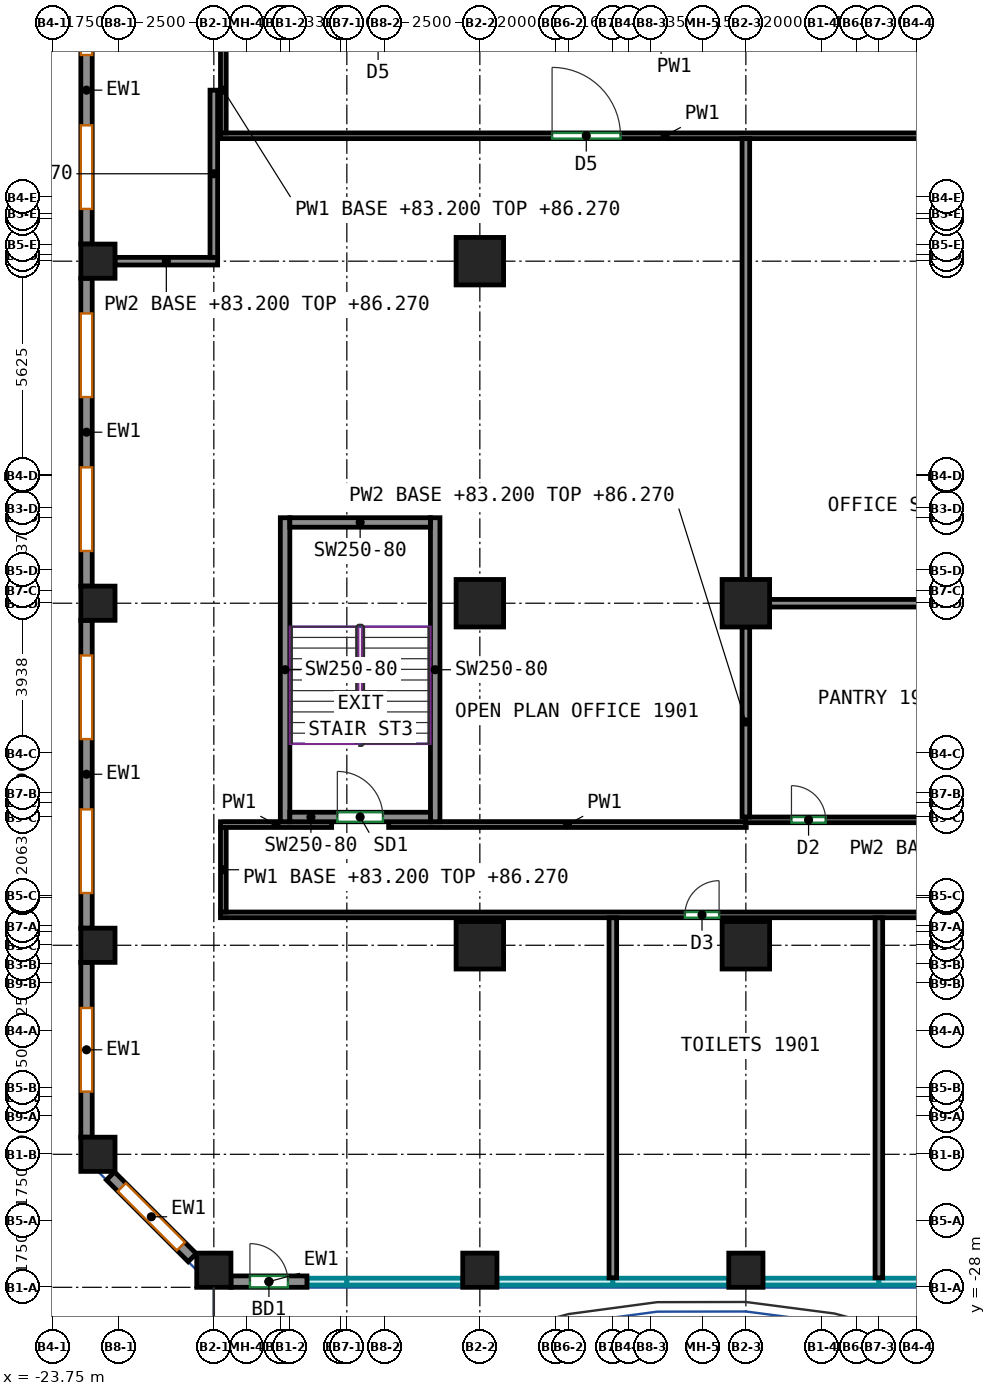
"""IFC4 building model, lengths in metres.
Left out: names, types, materials, properties, quantities, classifications, styles, units other than length and angle.
Written with IfcOpenShell. Run it as: python <this file> out.ifc"""

import sys

from ifc_helpers import new_model, si_unit, direction, frame, frame_2d, origin, origin_2d, place, context, subcontext, project, spatial, rectangle, extrude, source, transform, mapped, element, fill, save


model = new_model("IFC4")
c1 = context("Model", 3, precision=1e-05, world=origin(), true_north=direction((0.0, 1.0)))
c2 = subcontext(c1, "Body", "Model", "MODEL_VIEW")
j1 = project(units=[si_unit("LENGTHUNIT", "METRE"), si_unit("PLANEANGLEUNIT", "RADIAN")], contexts=[c1])
p1 = place(None, origin())
s1 = spatial("IfcSite", under=j1, at=p1, CompositionType="ELEMENT")
p2 = place(p1, origin())
s2 = spatial("IfcBuilding", under=s1, at=p2, CompositionType="ELEMENT")
p3 = place(p2, frame((0.0, 0.0, 83.2)))
s3 = spatial("IfcBuildingStorey", under=s2, at=p3, CompositionType="ELEMENT", Elevation=83.2)
m1 = source(origin(), c2, "Body", "SweptSolid", [
    extrude(rectangle(XDim=0.9, YDim=0.9, at=origin_2d()), origin(), (0.0, 0.0, 1.0), 3.72),
])
for number, where, z_axis, x_axis in (
    (1, (-22.55, -24.5, 0.0), (0.0, 0.0, 1.0), (1.0, 0.0, 0.0)),
    (2, (-22.55, -19.0, 0.0), (0.0, 0.0, 1.0), (1.0, 0.0, 0.0)),
    (3, (-22.55, -10.0, 0.0), (0.0, 0.0, 1.0), (1.0, 0.0, 0.0)),
    (4, (-22.55, -1.0, 0.0), (0.0, 0.0, 1.0), (1.0, 0.0, 0.0)),
    (5, (-19.5, -27.55, 0.0), (0.0, 0.0, 1.0), (1.0, 0.0, 0.0)),
    (6, (-12.5, -27.55, 0.0), (0.0, 0.0, 1.0), (1.0, 0.0, 0.0)),
):
    element("IfcColumn", number, at=place(p3, frame(where, z_axis=z_axis, x_axis=x_axis)), inside=s3, PredefinedType="COLUMN", context=c2, shape_type="MappedRepresentation", body=[
        mapped(m1, transform((0.0, 0.0, 0.0))),
    ])
m2 = source(origin(), c2, "Body", "SweptSolid", [
    extrude(rectangle(XDim=1.25, YDim=1.25, at=origin_2d()), origin(), (0.0, 0.0, 1.0), 3.72),
])
for number, where, z_axis, x_axis in (
    (7, (-12.5, -19.0, 0.0), (0.0, 0.0, 1.0), (1.0, 0.0, 0.0)),
    (8, (-12.5, -10.0, 0.0), (0.0, 0.0, 1.0), (1.0, 0.0, 0.0)),
    (9, (-12.5, -1.0, 0.0), (0.0, 0.0, 1.0), (1.0, 0.0, 0.0)),
):
    element("IfcColumn", number, at=place(p3, frame(where, z_axis=z_axis, x_axis=x_axis)), inside=s3, PredefinedType="COLUMN", context=c2, shape_type="MappedRepresentation", body=[
        mapped(m2, transform((0.0, 0.0, 0.0))),
    ])
p4 = place(p3, frame((-5.5, -27.55, 0.0), z_axis=(0.0, 0.0, 1.0), x_axis=(1.0, 0.0, 0.0)))
e10 = element("IfcColumn", 10, at=p4, inside=s3, PredefinedType="COLUMN", context=c2, shape_type="MappedRepresentation", body=[
    mapped(m1, transform((0.0, 0.0, 0.0))),
])
for number, where, z_axis, x_axis in (
    (11, (-5.5, -19.0, 0.0), (0.0, 0.0, 1.0), (1.0, 0.0, 0.0)),
    (12, (-5.5, -10.0, 0.0), (0.0, 0.0, 1.0), (1.0, 0.0, 0.0)),
):
    element("IfcColumn", number, at=place(p3, frame(where, z_axis=z_axis, x_axis=x_axis)), inside=s3, PredefinedType="COLUMN", context=c2, shape_type="MappedRepresentation", body=[
        mapped(m2, transform((0.0, 0.0, 0.0))),
    ])
m3 = source(origin(), c2, "Body", "SweptSolid", [
    extrude(rectangle(XDim=8.0, YDim=0.25, at=frame_2d((4.0, 0.0))), origin(), (0.0, 0.0, 1.0), 3.72),
])
for number, where, z_axis, x_axis in (
    (13, (-17.625, -15.75, 0.0), (0.0, 0.0, 1.0), (0.0, 1.0, 0.0)),
    (14, (-13.675, -15.75, 0.0), (0.0, 0.0, 1.0), (0.0, 1.0, 0.0)),
):
    element("IfcWall", number, at=place(p3, frame(where, z_axis=z_axis, x_axis=x_axis)), inside=s3, PredefinedType="SHEAR", context=c2, shape_type="MappedRepresentation", body=[
        mapped(m3, transform((0.0, 0.0, 0.0))),
    ])
m4 = source(origin(), c2, "Body", "SweptSolid", [
    extrude(rectangle(XDim=3.7, YDim=0.25, at=frame_2d((1.85, 0.0))), origin(), (0.0, 0.0, 1.0), 3.72),
])
p5 = place(p3, frame((-17.5, -15.625, 0.0), z_axis=(0.0, 0.0, 1.0), x_axis=(1.0, 0.0, 0.0)))
e15 = element("IfcWall", 15, at=p5, inside=s3, PredefinedType="SHEAR", context=c2, shape_type="MappedRepresentation", body=[
    mapped(m4, transform((0.0, 0.0, 0.0))),
])
p6 = place(p5, frame((1.25, 0.0, 0.0)))
e16 = element("IfcOpeningElement", 16, at=p6, cuts=e15, PredefinedType="OPENING", context=c2, shape_type="SweptSolid", body=[
    extrude(rectangle(XDim=1.2, YDim=2.1, at=frame_2d((0.6, 1.05))), frame((0.0, 0.135, 0.0), z_axis=(0.0, -1.0, 0.0), x_axis=(1.0, 0.0, 0.0)), (0.0, 0.0, 1.0), 0.27),
])
p7 = place(p3, frame((-17.5, -7.875, 0.0), z_axis=(0.0, 0.0, 1.0), x_axis=(1.0, 0.0, 0.0)))
e17 = element("IfcWall", 17, at=p7, inside=s3, PredefinedType="SHEAR", context=c2, shape_type="MappedRepresentation", body=[
    mapped(m4, transform((0.0, 0.0, 0.0))),
])
m5 = source(origin(), c2, "Body", "SweptSolid", [
    extrude(rectangle(XDim=2.0, YDim=0.3, at=frame_2d((1.0, 0.0))), origin(), (0.0, 0.0, 1.0), 3.72),
])
p8 = place(p3, frame((-19.05, -27.85, 0.0), z_axis=(0.0, 0.0, 1.0), x_axis=(1.0, 0.0, 0.0)))
e18 = element("IfcWall", 18, at=p8, inside=s3, PredefinedType="SOLIDWALL", context=c2, shape_type="MappedRepresentation", body=[
    mapped(m5, transform((0.0, 0.0, 0.0))),
])
p9 = place(p8, frame((0.5, 0.0, 0.0)))
e19 = element("IfcOpeningElement", 19, at=p9, cuts=e18, PredefinedType="OPENING", context=c2, shape_type="SweptSolid", body=[
    extrude(rectangle(XDim=1.0, YDim=2.1, at=frame_2d((0.5, 1.05))), frame((0.0, 0.16, 0.0), z_axis=(0.0, -1.0, 0.0), x_axis=(1.0, 0.0, 0.0)), (0.0, 0.0, 1.0), 0.32),
])
m6 = source(origin(), c2, "Body", "SweptSolid", [
    extrude(rectangle(XDim=8.1, YDim=0.3, at=frame_2d((4.05, 0.0))), origin(), (0.0, 0.0, 1.0), 3.72),
])
p10 = place(p3, frame((-22.85, 7.55, 0.0), z_axis=(0.0, 0.0, 1.0), x_axis=(0.0, -1.0, 0.0)))
e20 = element("IfcWall", 20, at=p10, inside=s3, PredefinedType="SOLIDWALL", context=c2, shape_type="MappedRepresentation", body=[
    mapped(m6, transform((0.0, 0.0, 0.0))),
])
p11 = place(p10, frame((0.925, 0.0, 0.7)))
e21 = element("IfcOpeningElement", 21, at=p11, cuts=e20, PredefinedType="OPENING", context=c2, shape_type="SweptSolid", body=[
    extrude(rectangle(XDim=2.2, YDim=2.25, at=frame_2d((1.1, 1.125))), frame((0.0, 0.16, 0.0), z_axis=(0.0, -1.0, 0.0), x_axis=(1.0, 0.0, 0.0)), (0.0, 0.0, 1.0), 0.32),
])
p12 = place(p10, frame((4.975, 0.0, 0.7)))
e22 = element("IfcOpeningElement", 22, at=p12, cuts=e20, PredefinedType="OPENING", context=c2, shape_type="SweptSolid", body=[
    extrude(rectangle(XDim=2.2, YDim=2.25, at=frame_2d((1.1, 1.125))), frame((0.0, 0.16, 0.0), z_axis=(0.0, -1.0, 0.0), x_axis=(1.0, 0.0, 0.0)), (0.0, 0.0, 1.0), 0.32),
])
p13 = place(p3, frame((-22.85, -1.45, 0.0), z_axis=(0.0, 0.0, 1.0), x_axis=(0.0, -1.0, 0.0)))
e23 = element("IfcWall", 23, at=p13, inside=s3, PredefinedType="SOLIDWALL", context=c2, shape_type="MappedRepresentation", body=[
    mapped(m6, transform((0.0, 0.0, 0.0))),
])
p14 = place(p13, frame((0.925, 0.0, 0.7)))
e24 = element("IfcOpeningElement", 24, at=p14, cuts=e23, PredefinedType="OPENING", context=c2, shape_type="SweptSolid", body=[
    extrude(rectangle(XDim=2.2, YDim=2.25, at=frame_2d((1.1, 1.125))), frame((0.0, 0.16, 0.0), z_axis=(0.0, -1.0, 0.0), x_axis=(1.0, 0.0, 0.0)), (0.0, 0.0, 1.0), 0.32),
])
p15 = place(p13, frame((4.975, 0.0, 0.7)))
e25 = element("IfcOpeningElement", 25, at=p15, cuts=e23, PredefinedType="OPENING", context=c2, shape_type="SweptSolid", body=[
    extrude(rectangle(XDim=2.2, YDim=2.25, at=frame_2d((1.1, 1.125))), frame((0.0, 0.16, 0.0), z_axis=(0.0, -1.0, 0.0), x_axis=(1.0, 0.0, 0.0)), (0.0, 0.0, 1.0), 0.32),
])
p16 = place(p3, frame((-22.85, -10.45, 0.0), z_axis=(0.0, 0.0, 1.0), x_axis=(0.0, -1.0, 0.0)))
e26 = element("IfcWall", 26, at=p16, inside=s3, PredefinedType="SOLIDWALL", context=c2, shape_type="MappedRepresentation", body=[
    mapped(m6, transform((0.0, 0.0, 0.0))),
])
p17 = place(p16, frame((0.925, 0.0, 0.7)))
e27 = element("IfcOpeningElement", 27, at=p17, cuts=e26, PredefinedType="OPENING", context=c2, shape_type="SweptSolid", body=[
    extrude(rectangle(XDim=2.2, YDim=2.25, at=frame_2d((1.1, 1.125))), frame((0.0, 0.16, 0.0), z_axis=(0.0, -1.0, 0.0), x_axis=(1.0, 0.0, 0.0)), (0.0, 0.0, 1.0), 0.32),
])
p18 = place(p16, frame((4.975, 0.0, 0.7)))
e28 = element("IfcOpeningElement", 28, at=p18, cuts=e26, PredefinedType="OPENING", context=c2, shape_type="SweptSolid", body=[
    extrude(rectangle(XDim=2.2, YDim=2.25, at=frame_2d((1.1, 1.125))), frame((0.0, 0.16, 0.0), z_axis=(0.0, -1.0, 0.0), x_axis=(1.0, 0.0, 0.0)), (0.0, 0.0, 1.0), 0.32),
])
m7 = source(origin(), c2, "Body", "SweptSolid", [
    extrude(rectangle(XDim=4.6, YDim=0.3, at=frame_2d((2.3, 0.0))), origin(), (0.0, 0.0, 1.0), 3.72),
])
p19 = place(p3, frame((-22.85, -19.45, 0.0), z_axis=(0.0, 0.0, 1.0), x_axis=(0.0, -1.0, 0.0)))
e29 = element("IfcWall", 29, at=p19, inside=s3, PredefinedType="SOLIDWALL", context=c2, shape_type="MappedRepresentation", body=[
    mapped(m7, transform((0.0, 0.0, 0.0))),
])
p20 = place(p19, frame((1.2, 0.0, 0.7)))
e30 = element("IfcOpeningElement", 30, at=p20, cuts=e29, PredefinedType="OPENING", context=c2, shape_type="SweptSolid", body=[
    extrude(rectangle(XDim=2.2, YDim=2.25, at=frame_2d((1.1, 1.125))), frame((0.0, 0.16, 0.0), z_axis=(0.0, -1.0, 0.0), x_axis=(1.0, 0.0, 0.0)), (0.0, 0.0, 1.0), 0.32),
])
m8 = source(origin(), c2, "Body", "SweptSolid", [
    extrude(rectangle(XDim=3.041, YDim=0.3, at=frame_2d((1.521, 0.0))), origin(), (0.0, 0.0, 1.0), 3.72),
])
p21 = place(p3, frame((-22.219, -25.069, 0.0), z_axis=(0.0, 0.0, 1.0), x_axis=(0.707106781187, -0.707106781187, 0.0)))
e31 = element("IfcWall", 31, at=p21, inside=s3, PredefinedType="SOLIDWALL", context=c2, shape_type="MappedRepresentation", body=[
    mapped(m8, transform((0.0, 0.0, 0.0))),
])
p22 = place(p21, frame((0.42, 0.0, 0.7)))
e32 = element("IfcOpeningElement", 32, at=p22, cuts=e31, PredefinedType="OPENING", context=c2, shape_type="SweptSolid", body=[
    extrude(rectangle(XDim=2.2, YDim=2.25, at=frame_2d((1.1, 1.125))), frame((0.0, 0.16, 0.0), z_axis=(0.0, -1.0, 0.0), x_axis=(1.0, 0.0, 0.0)), (0.0, 0.0, 1.0), 0.32),
])
p23 = place(p3, frame((-19.325, -18.2, 0.0), z_axis=(0.0, 0.0, 1.0), x_axis=(1.0, 0.0, 0.0)))
e33 = element("IfcWall", 33, at=p23, inside=s3, PredefinedType="PARTITIONING", context=c2, shape_type="SweptSolid", body=[
    extrude(rectangle(XDim=48.65, YDim=0.15, at=frame_2d((24.325, 0.0))), origin(), (0.0, 0.0, 1.0), 3.72),
])
p24 = place(p23, frame((12.221, 0.0, 0.0)))
e34 = element("IfcOpeningElement", 34, at=p24, cuts=e33, PredefinedType="OPENING", context=c2, shape_type="SweptSolid", body=[
    extrude(rectangle(XDim=0.9, YDim=2.1, at=frame_2d((0.45, 1.05))), frame((0.0, 0.085, 0.0), z_axis=(0.0, -1.0, 0.0), x_axis=(1.0, 0.0, 0.0)), (0.0, 0.0, 1.0), 0.17),
])
p25 = place(p23, frame((26.229, 0.0, 0.0)))
e35 = element("IfcOpeningElement", 35, at=p25, cuts=e33, PredefinedType="OPENING", context=c2, shape_type="SweptSolid", body=[
    extrude(rectangle(XDim=0.9, YDim=2.1, at=frame_2d((0.45, 1.05))), frame((0.0, 0.085, 0.0), z_axis=(0.0, -1.0, 0.0), x_axis=(1.0, 0.0, 0.0)), (0.0, 0.0, 1.0), 0.17),
])
p26 = place(p23, frame((38.029, 0.0, 0.0)))
e36 = element("IfcOpeningElement", 36, at=p26, cuts=e33, PredefinedType="OPENING", context=c2, shape_type="SweptSolid", body=[
    extrude(rectangle(XDim=0.9, YDim=2.1, at=frame_2d((0.45, 1.05))), frame((0.0, 0.085, 0.0), z_axis=(0.0, -1.0, 0.0), x_axis=(1.0, 0.0, 0.0)), (0.0, 0.0, 1.0), 0.17),
])
p27 = place(p3, frame((-19.25, -18.125, 0.0), z_axis=(0.0, 0.0, 1.0), x_axis=(0.0, 1.0, 0.0)))
e37 = element("IfcWall", 37, at=p27, inside=s3, PredefinedType="PARTITIONING", context=c2, shape_type="SweptSolid", body=[
    extrude(rectangle(XDim=2.225, YDim=0.15, at=frame_2d((1.113, 0.0))), origin(), (0.0, 0.0, 1.0), 3.07),
])
p28 = place(p3, frame((-14.9, -15.825, 0.0), z_axis=(0.0, 0.0, 1.0), x_axis=(1.0, 0.0, 0.0)))
e38 = element("IfcWall", 38, at=p28, inside=s3, PredefinedType="PARTITIONING", context=c2, shape_type="SweptSolid", body=[
    extrude(rectangle(XDim=9.41, YDim=0.15, at=frame_2d((4.705, 0.0))), origin(), (0.0, 0.0, 1.0), 3.72),
])
p29 = place(p3, frame((-19.325, -15.825, 0.0), z_axis=(0.0, 0.0, 1.0), x_axis=(1.0, 0.0, 0.0)))
e39 = element("IfcWall", 39, at=p29, inside=s3, PredefinedType="PARTITIONING", context=c2, shape_type="SweptSolid", body=[
    extrude(rectangle(XDim=2.925, YDim=0.15, at=frame_2d((1.462, 0.0))), origin(), (0.0, 0.0, 1.0), 3.72),
])
p30 = place(p3, frame((-19.325, 2.3, 0.0), z_axis=(0.0, 0.0, 1.0), x_axis=(1.0, 0.0, 0.0)))
e40 = element("IfcWall", 40, at=p30, inside=s3, PredefinedType="PARTITIONING", context=c2, shape_type="SweptSolid", body=[
    extrude(rectangle(XDim=23.4, YDim=0.15, at=frame_2d((11.7, 0.0))), origin(), (0.0, 0.0, 1.0), 3.72),
])
p31 = place(p30, frame((8.726, 0.0, 0.0)))
e41 = element("IfcOpeningElement", 41, at=p31, cuts=e40, PredefinedType="OPENING", context=c2, shape_type="SweptSolid", body=[
    extrude(rectangle(XDim=1.8, YDim=2.1, at=frame_2d((0.9, 1.05))), frame((0.0, 0.085, 0.0), z_axis=(0.0, -1.0, 0.0), x_axis=(1.0, 0.0, 0.0)), (0.0, 0.0, 1.0), 0.17),
])
p32 = place(p3, frame((-19.25, 2.375, 0.0), z_axis=(0.0, 0.0, 1.0), x_axis=(0.0, 1.0, 0.0)))
e42 = element("IfcWall", 42, at=p32, inside=s3, PredefinedType="PARTITIONING", context=c2, shape_type="SweptSolid", body=[
    extrude(rectangle(XDim=2.25, YDim=0.15, at=frame_2d((1.125, 0.0))), origin(), (0.0, 0.0, 1.0), 3.07),
])
p33 = place(p3, frame((-5.51, -15.7, 0.0), z_axis=(0.0, 0.0, 1.0), x_axis=(1.0, 0.0, 0.0)))
e43 = element("IfcWall", 43, at=p33, inside=s3, PredefinedType="PARTITIONING", context=c2, shape_type="SweptSolid", body=[
    extrude(rectangle(XDim=9.585, YDim=0.15, at=frame_2d((4.792, 0.0))), origin(), (0.0, 0.0, 1.0), 3.72),
])
p34 = place(p33, frame((1.21, 0.0, 0.0)))
e44 = element("IfcOpeningElement", 44, at=p34, cuts=e43, PredefinedType="OPENING", context=c2, shape_type="SweptSolid", body=[
    extrude(rectangle(XDim=0.9, YDim=2.1, at=frame_2d((0.45, 1.05))), frame((0.0, 0.085, 0.0), z_axis=(0.0, -1.0, 0.0), x_axis=(1.0, 0.0, 0.0)), (0.0, 0.0, 1.0), 0.17),
])
p35 = place(p3, frame((-19.4, -1.0, 0.0), z_axis=(0.0, 0.0, 1.0), x_axis=(-1.0, 0.0, 0.0)))
e45 = element("IfcWall", 45, at=p35, inside=s3, PredefinedType="PARTITIONING", context=c2, shape_type="SweptSolid", body=[
    extrude(rectangle(XDim=2.7, YDim=0.2, at=frame_2d((1.35, 0.0))), origin(), (0.0, 0.0, 1.0), 3.07),
])
p36 = place(p3, frame((-19.5, 3.5, 0.0), z_axis=(0.0, 0.0, 1.0), x_axis=(0.0, -1.0, 0.0)))
e46 = element("IfcWall", 46, at=p36, inside=s3, PredefinedType="PARTITIONING", context=c2, shape_type="SweptSolid", body=[
    extrude(rectangle(XDim=4.4, YDim=0.2, at=frame_2d((2.2, 0.0))), origin(), (0.0, 0.0, 1.0), 3.07),
])
p37 = place(p3, frame((-9.0, -27.75, 0.0), z_axis=(0.0, 0.0, 1.0), x_axis=(0.0, 1.0, 0.0)))
e47 = element("IfcWall", 47, at=p37, inside=s3, PredefinedType="PARTITIONING", context=c2, shape_type="SweptSolid", body=[
    extrude(rectangle(XDim=9.474, YDim=0.2, at=frame_2d((4.737, 0.0))), origin(), (0.0, 0.0, 1.0), 3.72),
])
p38 = place(p3, frame((-5.5, -15.624, 0.0), z_axis=(0.0, 0.0, 1.0), x_axis=(0.0, 1.0, 0.0)))
e48 = element("IfcWall", 48, at=p38, inside=s3, PredefinedType="PARTITIONING", context=c2, shape_type="SweptSolid", body=[
    extrude(rectangle(XDim=4.999, YDim=0.2, at=frame_2d((2.5, 0.0))), origin(), (0.0, 0.0, 1.0), 3.07),
])
p39 = place(p3, frame((-5.5, -9.375, 0.0), z_axis=(0.0, 0.0, 1.0), x_axis=(0.0, 1.0, 0.0)))
e49 = element("IfcWall", 49, at=p39, inside=s3, PredefinedType="PARTITIONING", context=c2, shape_type="SweptSolid", body=[
    extrude(rectangle(XDim=11.599, YDim=0.2, at=frame_2d((5.8, 0.0))), origin(), (0.0, 0.0, 1.0), 3.72),
])
p40 = place(p3, frame((-2.0, -27.75, 0.0), z_axis=(0.0, 0.0, 1.0), x_axis=(0.0, 1.0, 0.0)))
e50 = element("IfcWall", 50, at=p40, inside=s3, PredefinedType="PARTITIONING", context=c2, shape_type="SweptSolid", body=[
    extrude(rectangle(XDim=9.474, YDim=0.2, at=frame_2d((4.737, 0.0))), origin(), (0.0, 0.0, 1.0), 3.72),
])
p41 = place(p3, frame((-4.875, -10.0, 0.0), z_axis=(0.0, 0.0, 1.0), x_axis=(1.0, 0.0, 0.0)))
e51 = element("IfcWall", 51, at=p41, inside=s3, PredefinedType="PARTITIONING", context=c2, shape_type="SweptSolid", body=[
    extrude(rectangle(XDim=5.75, YDim=0.2, at=frame_2d((2.875, 0.0))), origin(), (0.0, 0.0, 1.0), 3.72),
])
p42 = place(p9, origin())
e52 = element("IfcDoor", 52, at=p42, inside=s3, OperationType="SINGLE_SWING_LEFT", PredefinedType="DOOR", context=c2, shape_type="SweptSolid", body=[
    extrude(rectangle(XDim=1.0, YDim=2.1, at=frame_2d((0.5, 1.05))), frame((0.0, 0.025, 0.0), z_axis=(0.0, -1.0, 0.0), x_axis=(1.0, 0.0, 0.0)), (0.0, 0.0, 1.0), 0.05),
])
fill(e19, e52)
p43 = place(p11, origin())
e53 = element("IfcWindow", 53, at=p43, inside=s3, PartitioningType="SINGLE_PANEL", PredefinedType="WINDOW", context=c2, shape_type="SweptSolid", body=[
    extrude(rectangle(XDim=2.2, YDim=2.25, at=frame_2d((1.1, 1.125))), frame((0.0, 0.03, 0.0), z_axis=(0.0, -1.0, 0.0), x_axis=(1.0, 0.0, 0.0)), (0.0, 0.0, 1.0), 0.06),
])
fill(e21, e53)
p44 = place(p12, origin())
e54 = element("IfcWindow", 54, at=p44, inside=s3, PartitioningType="SINGLE_PANEL", PredefinedType="WINDOW", context=c2, shape_type="SweptSolid", body=[
    extrude(rectangle(XDim=2.2, YDim=2.25, at=frame_2d((1.1, 1.125))), frame((0.0, 0.03, 0.0), z_axis=(0.0, -1.0, 0.0), x_axis=(1.0, 0.0, 0.0)), (0.0, 0.0, 1.0), 0.06),
])
fill(e22, e54)
p45 = place(p14, origin())
e55 = element("IfcWindow", 55, at=p45, inside=s3, PartitioningType="SINGLE_PANEL", PredefinedType="WINDOW", context=c2, shape_type="SweptSolid", body=[
    extrude(rectangle(XDim=2.2, YDim=2.25, at=frame_2d((1.1, 1.125))), frame((0.0, 0.03, 0.0), z_axis=(0.0, -1.0, 0.0), x_axis=(1.0, 0.0, 0.0)), (0.0, 0.0, 1.0), 0.06),
])
fill(e24, e55)
p46 = place(p15, origin())
e56 = element("IfcWindow", 56, at=p46, inside=s3, PartitioningType="SINGLE_PANEL", PredefinedType="WINDOW", context=c2, shape_type="SweptSolid", body=[
    extrude(rectangle(XDim=2.2, YDim=2.25, at=frame_2d((1.1, 1.125))), frame((0.0, 0.03, 0.0), z_axis=(0.0, -1.0, 0.0), x_axis=(1.0, 0.0, 0.0)), (0.0, 0.0, 1.0), 0.06),
])
fill(e25, e56)
p47 = place(p17, origin())
e57 = element("IfcWindow", 57, at=p47, inside=s3, PartitioningType="SINGLE_PANEL", PredefinedType="WINDOW", context=c2, shape_type="SweptSolid", body=[
    extrude(rectangle(XDim=2.2, YDim=2.25, at=frame_2d((1.1, 1.125))), frame((0.0, 0.03, 0.0), z_axis=(0.0, -1.0, 0.0), x_axis=(1.0, 0.0, 0.0)), (0.0, 0.0, 1.0), 0.06),
])
fill(e27, e57)
p48 = place(p18, origin())
e58 = element("IfcWindow", 58, at=p48, inside=s3, PartitioningType="SINGLE_PANEL", PredefinedType="WINDOW", context=c2, shape_type="SweptSolid", body=[
    extrude(rectangle(XDim=2.2, YDim=2.25, at=frame_2d((1.1, 1.125))), frame((0.0, 0.03, 0.0), z_axis=(0.0, -1.0, 0.0), x_axis=(1.0, 0.0, 0.0)), (0.0, 0.0, 1.0), 0.06),
])
fill(e28, e58)
p49 = place(p20, origin())
e59 = element("IfcWindow", 59, at=p49, inside=s3, PartitioningType="SINGLE_PANEL", PredefinedType="WINDOW", context=c2, shape_type="SweptSolid", body=[
    extrude(rectangle(XDim=2.2, YDim=2.25, at=frame_2d((1.1, 1.125))), frame((0.0, 0.03, 0.0), z_axis=(0.0, -1.0, 0.0), x_axis=(1.0, 0.0, 0.0)), (0.0, 0.0, 1.0), 0.06),
])
fill(e30, e59)
p50 = place(p22, origin())
e60 = element("IfcWindow", 60, at=p50, inside=s3, PartitioningType="SINGLE_PANEL", PredefinedType="WINDOW", context=c2, shape_type="SweptSolid", body=[
    extrude(rectangle(XDim=2.2, YDim=2.25, at=frame_2d((1.1, 1.125))), frame((0.0, 0.03, 0.0), z_axis=(0.0, -1.0, 0.0), x_axis=(1.0, 0.0, 0.0)), (0.0, 0.0, 1.0), 0.06),
])
fill(e32, e60)
p51 = place(p6, origin())
e61 = element("IfcDoor", 61, at=p51, inside=s3, OperationType="DOUBLE_DOOR_SINGLE_SWING", PredefinedType="DOOR", context=c2, shape_type="SweptSolid", body=[
    extrude(rectangle(XDim=1.2, YDim=2.1, at=frame_2d((0.6, 1.05))), frame((0.0, 0.025, 0.0), z_axis=(0.0, -1.0, 0.0), x_axis=(1.0, 0.0, 0.0)), (0.0, 0.0, 1.0), 0.05),
])
fill(e16, e61)
p52 = place(p24, origin())
e62 = element("IfcDoor", 62, at=p52, inside=s3, OperationType="SINGLE_SWING_RIGHT", PredefinedType="DOOR", context=c2, shape_type="SweptSolid", body=[
    extrude(rectangle(XDim=0.9, YDim=2.1, at=frame_2d((0.45, 1.05))), frame((0.0, 0.025, 0.0), z_axis=(0.0, -1.0, 0.0), x_axis=(1.0, 0.0, 0.0)), (0.0, 0.0, 1.0), 0.05),
])
fill(e34, e62)
p53 = place(p34, origin())
e63 = element("IfcDoor", 63, at=p53, inside=s3, OperationType="SINGLE_SWING_LEFT", PredefinedType="DOOR", context=c2, shape_type="SweptSolid", body=[
    extrude(rectangle(XDim=0.9, YDim=2.1, at=frame_2d((0.45, 1.05))), frame((0.0, 0.025, 0.0), z_axis=(0.0, -1.0, 0.0), x_axis=(1.0, 0.0, 0.0)), (0.0, 0.0, 1.0), 0.05),
])
fill(e44, e63)
p54 = place(p31, origin())
e64 = element("IfcDoor", 64, at=p54, inside=s3, OperationType="DOUBLE_DOOR_SINGLE_SWING", PredefinedType="DOOR", context=c2, shape_type="SweptSolid", body=[
    extrude(rectangle(XDim=1.8, YDim=2.1, at=frame_2d((0.9, 1.05))), frame((0.0, 0.025, 0.0), z_axis=(0.0, -1.0, 0.0), x_axis=(1.0, 0.0, 0.0)), (0.0, 0.0, 1.0), 0.05),
])
fill(e41, e64)
save(model, sys.argv[1])
